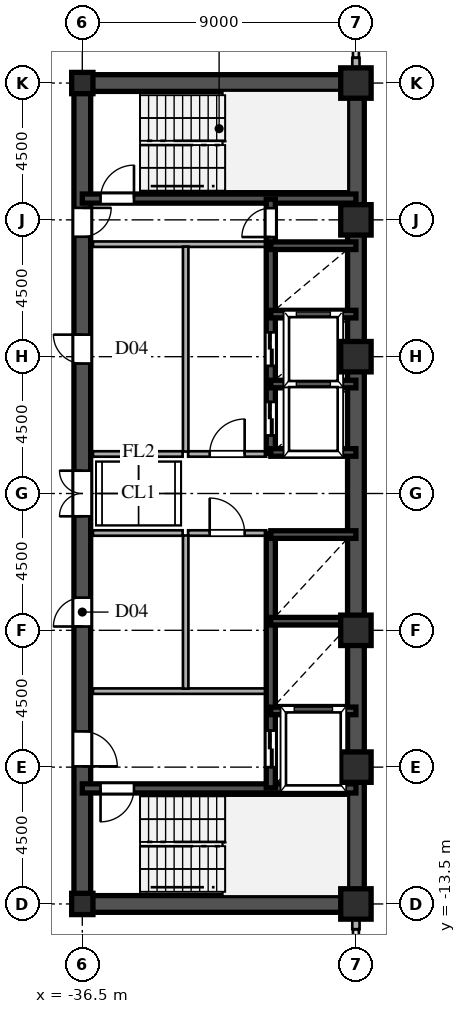
"""IFC4 building model, lengths in metres.
Left out: names, types, materials, properties, quantities, classifications, styles, units other than length and angle.
Written with IfcOpenShell. Run it as: python <this file> out.ifc"""

import sys

from ifc_helpers import new_model, si_unit, direction, frame, frame_2d, origin, origin_2d, place, context, subcontext, project, spatial, rectangle, hollow_rectangle, i_section, extrude, source, transform, mapped, element, fill, save


model = new_model("IFC4")
c1 = context("Model", 3, precision=1e-05, world=origin(), true_north=direction((0.0, 1.0)))
c2 = subcontext(c1, "Body", "Model", "MODEL_VIEW")
j1 = project(units=[si_unit("LENGTHUNIT", "METRE"), si_unit("PLANEANGLEUNIT", "RADIAN")], contexts=[c1])
p1 = place(None, origin())
s1 = spatial("IfcSite", under=j1, at=p1, CompositionType="ELEMENT")
p2 = place(p1, origin())
s2 = spatial("IfcBuilding", under=s1, at=p2, CompositionType="ELEMENT")
p3 = place(p2, frame((0.0, 0.0, 140.4)))
s3 = spatial("IfcBuildingStorey", under=s2, at=p3, CompositionType="ELEMENT", Elevation=140.4)
m1 = source(origin(), c2, "Body", "SweptSolid", [
    extrude(hollow_rectangle(XDim=1.0, YDim=1.0, WallThickness=0.042, at=origin_2d()), origin(), (0.0, 0.0, 1.0), 3.6),
])
for number, where, z_axis, x_axis in (
    (1, (-27.5, -13.5, 0.0), (0.0, 0.0, 1.0), (1.0, 0.0, 0.0)),
    (2, (-27.5, -9.0, 0.0), (0.0, 0.0, 1.0), (1.0, 0.0, 0.0)),
    (3, (-27.5, -4.5, 0.0), (0.0, 0.0, 1.0), (1.0, 0.0, 0.0)),
    (4, (-27.5, 4.5, 0.0), (0.0, 0.0, 1.0), (1.0, 0.0, 0.0)),
    (5, (-27.5, 9.0, 0.0), (0.0, 0.0, 1.0), (1.0, 0.0, 0.0)),
    (6, (-27.5, 13.5, 0.0), (0.0, 0.0, 1.0), (1.0, 0.0, 0.0)),
):
    element("IfcColumn", number, at=place(p3, frame(where, z_axis=z_axis, x_axis=x_axis)), inside=s3, PredefinedType="COLUMN", context=c2, shape_type="MappedRepresentation", body=[
        mapped(m1, transform((0.0, 0.0, 0.0), scale=1.0)),
    ])
m2 = source(origin(), c2, "Body", "SweptSolid", [
    extrude(i_section(OverallWidth=0.7, OverallDepth=0.7, WebThickness=0.028, FlangeThickness=0.045, at=origin_2d()), origin(), (0.0, 0.0, 1.0), 3.6),
])
for number, where, z_axis, x_axis in (
    (7, (-36.5, -13.5, 0.0), (0.0, 0.0, 1.0), (1.0, 0.0, 0.0)),
    (8, (-36.5, 13.5, 0.0), (0.0, 0.0, 1.0), (1.0, 0.0, 0.0)),
):
    element("IfcColumn", number, at=place(p3, frame(where, z_axis=z_axis, x_axis=x_axis)), inside=s3, PredefinedType="COLUMN", context=c2, shape_type="MappedRepresentation", body=[
        mapped(m2, transform((0.0, 0.0, 0.0), scale=1.0)),
    ])
for number, where, z_axis, x_axis in (
    (9, (-27.5, -14.33, 0.0), (0.0, 0.0, 1.0), (0.0, 1.0, 0.0)),
    (10, (-27.5, 13.78, 0.0), (0.0, 0.0, 1.0), (0.0, 1.0, 0.0)),
):
    element("IfcWall", number, at=place(p3, frame(where, z_axis=z_axis, x_axis=x_axis)), inside=s3, PredefinedType="SOLIDWALL", context=c2, shape_type="SweptSolid", body=[
        extrude(rectangle(XDim=0.55, YDim=0.24, at=frame_2d((0.275, 0.0))), origin(), (0.0, 0.0, 1.0), 2.88),
    ])
for number, where, z_axis, x_axis in (
    (11, (-27.5, -13.5, 0.0), (0.0, 0.0, 1.0), (0.0, 1.0, 0.0)),
    (12, (-27.5, 1.3, 0.0), (0.0, 0.0, 1.0), (0.0, 1.0, 0.0)),
):
    element("IfcWall", number, at=place(p3, frame(where, z_axis=z_axis, x_axis=x_axis)), inside=s3, PredefinedType="SHEAR", context=c2, shape_type="SweptSolid", body=[
        extrude(rectangle(XDim=12.2, YDim=0.55, at=frame_2d((6.1, 0.0))), origin(), (0.0, 0.0, 1.0), 3.38),
    ])
p4 = place(p3, frame((-27.5, -1.3, 0.0), z_axis=(0.0, 0.0, 1.0), x_axis=(0.0, 1.0, 0.0)))
e13 = element("IfcWall", 13, at=p4, inside=s3, PredefinedType="SHEAR", context=c2, shape_type="SweptSolid", body=[
    extrude(rectangle(XDim=2.6, YDim=0.55, at=frame_2d((1.3, 0.0))), origin(), (0.0, 0.0, 1.0), 3.38),
])
for number, where, z_axis, x_axis in (
    (14, (-36.5, -13.5, 0.0), (0.0, 0.0, 1.0), (1.0, 0.0, 0.0)),
    (15, (-36.5, 13.5, 0.0), (0.0, 0.0, 1.0), (1.0, 0.0, 0.0)),
):
    element("IfcWall", number, at=place(p3, frame(where, z_axis=z_axis, x_axis=x_axis)), inside=s3, PredefinedType="SHEAR", context=c2, shape_type="SweptSolid", body=[
        extrude(rectangle(XDim=9.0, YDim=0.55, at=frame_2d((4.5, 0.0))), origin(), (0.0, 0.0, 1.0), 3.38),
    ])
p5 = place(p3, frame((-36.5, -13.65, 0.0), z_axis=(0.0, 0.0, 1.0), x_axis=(0.0, 1.0, 0.0)))
e16 = element("IfcWall", 16, at=p5, inside=s3, PredefinedType="SHEAR", context=c2, shape_type="SweptSolid", body=[
    extrude(rectangle(XDim=7.15, YDim=0.55, at=frame_2d((3.575, 0.0))), origin(), (0.0, 0.0, 1.0), 3.38),
])
p6 = place(p5, frame((4.675, 0.0, 0.0)))
e17 = element("IfcOpeningElement", 17, at=p6, cuts=e16, PredefinedType="OPENING", context=c2, shape_type="SweptSolid", body=[
    extrude(rectangle(XDim=1.15, YDim=2.2, at=frame_2d((0.575, 1.1))), frame((0.0, 0.285, 0.0), z_axis=(0.0, -1.0, 0.0), x_axis=(1.0, 0.0, 0.0)), (0.0, 0.0, 1.0), 0.57),
])
p7 = place(p3, frame((-36.5, -1.3, 0.0), z_axis=(0.0, 0.0, 1.0), x_axis=(0.0, 1.0, 0.0)))
e18 = element("IfcWall", 18, at=p7, inside=s3, PredefinedType="SHEAR", context=c2, shape_type="SweptSolid", body=[
    extrude(rectangle(XDim=2.6, YDim=0.55, at=frame_2d((1.3, 0.0))), origin(), (0.0, 0.0, 1.0), 3.38),
])
p8 = place(p7, frame((0.55, 0.0, 0.0)))
e19 = element("IfcOpeningElement", 19, at=p8, cuts=e18, PredefinedType="OPENING", context=c2, shape_type="SweptSolid", body=[
    extrude(rectangle(XDim=1.5, YDim=2.3, at=frame_2d((0.75, 1.15))), frame((0.0, 0.285, 0.0), z_axis=(0.0, -1.0, 0.0), x_axis=(1.0, 0.0, 0.0)), (0.0, 0.0, 1.0), 0.57),
])
p9 = place(p3, frame((-36.5, 8.2, 0.0), z_axis=(0.0, 0.0, 1.0), x_axis=(0.0, 1.0, 0.0)))
e20 = element("IfcWall", 20, at=p9, inside=s3, PredefinedType="SHEAR", context=c2, shape_type="SweptSolid", body=[
    extrude(rectangle(XDim=5.45, YDim=0.55, at=frame_2d((2.725, 0.0))), origin(), (0.0, 0.0, 1.0), 3.38),
])
p10 = place(p9, frame((0.245, 0.0, 0.0)))
e21 = element("IfcOpeningElement", 21, at=p10, cuts=e20, PredefinedType="OPENING", context=c2, shape_type="SweptSolid", body=[
    extrude(rectangle(XDim=0.95, YDim=2.15, at=frame_2d((0.475, 1.075))), frame((0.0, 0.285, 0.0), z_axis=(0.0, -1.0, 0.0), x_axis=(1.0, 0.0, 0.0)), (0.0, 0.0, 1.0), 0.57),
])
p11 = place(p3, frame((-36.5, -6.5, 0.0), z_axis=(0.0, 0.0, 1.0), x_axis=(0.0, 1.0, 0.0)))
e22 = element("IfcWall", 22, at=p11, inside=s3, PredefinedType="SHEAR", context=c2, shape_type="SweptSolid", body=[
    extrude(rectangle(XDim=5.2, YDim=0.55, at=frame_2d((2.6, 0.0))), origin(), (0.0, 0.0, 1.0), 3.38),
])
p12 = place(p11, frame((2.125, 0.0, 0.0)))
e23 = element("IfcOpeningElement", 23, at=p12, cuts=e22, PredefinedType="OPENING", context=c2, shape_type="SweptSolid", body=[
    extrude(rectangle(XDim=0.95, YDim=2.15, at=frame_2d((0.475, 1.075))), frame((0.0, 0.285, 0.0), z_axis=(0.0, -1.0, 0.0), x_axis=(1.0, 0.0, 0.0)), (0.0, 0.0, 1.0), 0.57),
])
p13 = place(p3, frame((-36.5, 1.3, 0.0), z_axis=(0.0, 0.0, 1.0), x_axis=(0.0, 1.0, 0.0)))
e24 = element("IfcWall", 24, at=p13, inside=s3, PredefinedType="SHEAR", context=c2, shape_type="SweptSolid", body=[
    extrude(rectangle(XDim=6.9, YDim=0.55, at=frame_2d((3.45, 0.0))), origin(), (0.0, 0.0, 1.0), 3.38),
])
p14 = place(p13, frame((2.975, 0.0, 0.0)))
e25 = element("IfcOpeningElement", 25, at=p14, cuts=e24, PredefinedType="OPENING", context=c2, shape_type="SweptSolid", body=[
    extrude(rectangle(XDim=0.95, YDim=2.15, at=frame_2d((0.475, 1.075))), frame((0.0, 0.285, 0.0), z_axis=(0.0, -1.0, 0.0), x_axis=(1.0, 0.0, 0.0)), (0.0, 0.0, 1.0), 0.57),
])
p15 = place(p3, frame((-36.5, -9.7, 0.0), z_axis=(0.0, 0.0, 1.0), x_axis=(1.0, 0.0, 0.0)))
e26 = element("IfcWall", 26, at=p15, inside=s3, PredefinedType="SHEAR", context=c2, shape_type="SweptSolid", body=[
    extrude(rectangle(XDim=9.0, YDim=0.3, at=frame_2d((4.5, 0.0))), origin(), (0.0, 0.0, 1.0), 3.38),
])
p16 = place(p15, frame((0.6, 0.0, 0.0)))
e27 = element("IfcOpeningElement", 27, at=p16, cuts=e26, PredefinedType="OPENING", context=c2, shape_type="SweptSolid", body=[
    extrude(rectangle(XDim=1.1, YDim=2.2, at=frame_2d((0.55, 1.1))), frame((0.0, 0.16, 0.0), z_axis=(0.0, -1.0, 0.0), x_axis=(1.0, 0.0, 0.0)), (0.0, 0.0, 1.0), 0.32),
])
p17 = place(p3, frame((-36.5, 9.7, 0.0), z_axis=(0.0, 0.0, 1.0), x_axis=(1.0, 0.0, 0.0)))
e28 = element("IfcWall", 28, at=p17, inside=s3, PredefinedType="SHEAR", context=c2, shape_type="SweptSolid", body=[
    extrude(rectangle(XDim=9.0, YDim=0.3, at=frame_2d((4.5, 0.0))), origin(), (0.0, 0.0, 1.0), 3.38),
])
p18 = place(p17, frame((0.6, 0.0, 0.0)))
e29 = element("IfcOpeningElement", 29, at=p18, cuts=e28, PredefinedType="OPENING", context=c2, shape_type="SweptSolid", body=[
    extrude(rectangle(XDim=1.1, YDim=2.2, at=frame_2d((0.55, 1.1))), frame((0.0, 0.16, 0.0), z_axis=(0.0, -1.0, 0.0), x_axis=(1.0, 0.0, 0.0)), (0.0, 0.0, 1.0), 0.32),
])
for number, where, z_axis, x_axis in (
    (30, (-30.3, -7.15, 0.0), (0.0, 0.0, 1.0), (1.0, 0.0, 0.0)),
    (31, (-30.3, -4.2, 0.0), (0.0, 0.0, 1.0), (1.0, 0.0, 0.0)),
    (32, (-30.3, -1.35, 0.0), (0.0, 0.0, 1.0), (1.0, 0.0, 0.0)),
    (33, (-30.3, 1.35, 0.0), (0.0, 0.0, 1.0), (1.0, 0.0, 0.0)),
    (34, (-30.3, 3.6, 0.0), (0.0, 0.0, 1.0), (1.0, 0.0, 0.0)),
    (35, (-30.3, 5.9, 0.0), (0.0, 0.0, 1.0), (1.0, 0.0, 0.0)),
    (36, (-30.3, 8.15, 0.0), (0.0, 0.0, 1.0), (1.0, 0.0, 0.0)),
):
    element("IfcWall", number, at=place(p3, frame(where, z_axis=z_axis, x_axis=x_axis)), inside=s3, PredefinedType="SHEAR", context=c2, shape_type="SweptSolid", body=[
        extrude(rectangle(XDim=2.8, YDim=0.25, at=frame_2d((1.4, 0.0))), origin(), (0.0, 0.0, 1.0), 3.38),
    ])
p19 = place(p3, frame((-30.3, -9.68, 0.0), z_axis=(0.0, 0.0, 1.0), x_axis=(0.0, 1.0, 0.0)))
e37 = element("IfcWall", 37, at=p19, inside=s3, PredefinedType="SHEAR", context=c2, shape_type="SweptSolid", body=[
    extrude(rectangle(XDim=2.56, YDim=0.3, at=frame_2d((1.28, 0.0))), origin(), (0.0, 0.0, 1.0), 3.38),
])
p20 = place(p19, frame((0.68, 0.0, 0.0)))
e38 = element("IfcOpeningElement", 38, at=p20, cuts=e37, PredefinedType="OPENING", context=c2, shape_type="SweptSolid", body=[
    extrude(rectangle(XDim=1.2, YDim=2.25, at=frame_2d((0.6, 1.125))), frame((0.0, 0.16, 0.0), z_axis=(0.0, -1.0, 0.0), x_axis=(1.0, 0.0, 0.0)), (0.0, 0.0, 1.0), 0.32),
])
p21 = place(p3, frame((-30.3, -7.12, 0.0), z_axis=(0.0, 0.0, 1.0), x_axis=(0.0, 1.0, 0.0)))
e39 = element("IfcWall", 39, at=p21, inside=s3, PredefinedType="SHEAR", context=c2, shape_type="SweptSolid", body=[
    extrude(rectangle(XDim=5.8, YDim=0.3, at=frame_2d((2.9, 0.0))), origin(), (0.0, 0.0, 1.0), 3.38),
])
p22 = place(p3, frame((-30.3, 1.32, 0.0), z_axis=(0.0, 0.0, 1.0), x_axis=(0.0, 1.0, 0.0)))
e40 = element("IfcWall", 40, at=p22, inside=s3, PredefinedType="SHEAR", context=c2, shape_type="SweptSolid", body=[
    extrude(rectangle(XDim=2.28, YDim=0.3, at=frame_2d((1.14, 0.0))), origin(), (0.0, 0.0, 1.0), 3.38),
])
p23 = place(p22, frame((0.59, 0.0, 0.0)))
e41 = element("IfcOpeningElement", 41, at=p23, cuts=e40, PredefinedType="OPENING", context=c2, shape_type="SweptSolid", body=[
    extrude(rectangle(XDim=1.1, YDim=2.2, at=frame_2d((0.55, 1.1))), frame((0.0, 0.16, 0.0), z_axis=(0.0, -1.0, 0.0), x_axis=(1.0, 0.0, 0.0)), (0.0, 0.0, 1.0), 0.32),
])
p24 = place(p3, frame((-30.3, 3.6, 0.0), z_axis=(0.0, 0.0, 1.0), x_axis=(0.0, 1.0, 0.0)))
e42 = element("IfcWall", 42, at=p24, inside=s3, PredefinedType="SHEAR", context=c2, shape_type="SweptSolid", body=[
    extrude(rectangle(XDim=2.3, YDim=0.3, at=frame_2d((1.15, 0.0))), origin(), (0.0, 0.0, 1.0), 3.38),
])
p25 = place(p24, frame((0.6, 0.0, 0.0)))
e43 = element("IfcOpeningElement", 43, at=p25, cuts=e42, PredefinedType="OPENING", context=c2, shape_type="SweptSolid", body=[
    extrude(rectangle(XDim=1.1, YDim=2.2, at=frame_2d((0.55, 1.1))), frame((0.0, 0.16, 0.0), z_axis=(0.0, -1.0, 0.0), x_axis=(1.0, 0.0, 0.0)), (0.0, 0.0, 1.0), 0.32),
])
p26 = place(p3, frame((-30.3, 5.9, 0.0), z_axis=(0.0, 0.0, 1.0), x_axis=(0.0, 1.0, 0.0)))
e44 = element("IfcWall", 44, at=p26, inside=s3, PredefinedType="SHEAR", context=c2, shape_type="SweptSolid", body=[
    extrude(rectangle(XDim=2.25, YDim=0.3, at=frame_2d((1.125, 0.0))), origin(), (0.0, 0.0, 1.0), 3.38),
])
p27 = place(p3, frame((-30.3, 8.15, 0.0), z_axis=(0.0, 0.0, 1.0), x_axis=(0.0, 1.0, 0.0)))
e45 = element("IfcWall", 45, at=p27, inside=s3, PredefinedType="SHEAR", context=c2, shape_type="SweptSolid", body=[
    extrude(rectangle(XDim=1.53, YDim=0.3, at=frame_2d((0.765, 0.0))), origin(), (0.0, 0.0, 1.0), 3.38),
])
p28 = place(p27, frame((0.285, 0.0, 0.0)))
e46 = element("IfcOpeningElement", 46, at=p28, cuts=e45, PredefinedType="OPENING", context=c2, shape_type="SweptSolid", body=[
    extrude(rectangle(XDim=0.95, YDim=2.15, at=frame_2d((0.475, 1.075))), frame((0.0, 0.16, 0.0), z_axis=(0.0, -1.0, 0.0), x_axis=(1.0, 0.0, 0.0)), (0.0, 0.0, 1.0), 0.32),
])
for number, where, z_axis, x_axis in (
    (47, (-36.15, -6.5, 0.0), (0.0, 0.0, 1.0), (1.0, 0.0, 0.0)),
    (48, (-36.15, 8.2, 0.0), (0.0, 0.0, 1.0), (1.0, 0.0, 0.0)),
):
    element("IfcWall", number, at=place(p3, frame(where, z_axis=z_axis, x_axis=x_axis)), inside=s3, PredefinedType="PARTITIONING", context=c2, shape_type="SweptSolid", body=[
        extrude(rectangle(XDim=5.7, YDim=0.18, at=frame_2d((2.85, 0.0))), origin(), (0.0, 0.0, 1.0), 3.38),
    ])
p29 = place(p3, frame((-33.1, -6.42, 0.0), z_axis=(0.0, 0.0, 1.0), x_axis=(0.0, 1.0, 0.0)))
e49 = element("IfcWall", 49, at=p29, inside=s3, PredefinedType="PARTITIONING", context=c2, shape_type="SweptSolid", body=[
    extrude(rectangle(XDim=5.04, YDim=0.18, at=frame_2d((2.52, 0.0))), origin(), (0.0, 0.0, 1.0), 3.38),
])
p30 = place(p3, frame((-33.1, 1.38, 0.0), z_axis=(0.0, 0.0, 1.0), x_axis=(0.0, 1.0, 0.0)))
e50 = element("IfcWall", 50, at=p30, inside=s3, PredefinedType="PARTITIONING", context=c2, shape_type="SweptSolid", body=[
    extrude(rectangle(XDim=6.74, YDim=0.18, at=frame_2d((3.37, 0.0))), origin(), (0.0, 0.0, 1.0), 3.38),
])
p31 = place(p3, frame((-33.02, -1.3, 0.0), z_axis=(0.0, 0.0, 1.0), x_axis=(1.0, 0.0, 0.0)))
e51 = element("IfcWall", 51, at=p31, inside=s3, PredefinedType="PARTITIONING", context=c2, shape_type="SweptSolid", body=[
    extrude(rectangle(XDim=2.57, YDim=0.18, at=frame_2d((1.285, 0.0))), origin(), (0.0, 0.0, 1.0), 3.38),
])
p32 = place(p31, frame((0.71, 0.0, 0.0)))
e52 = element("IfcOpeningElement", 52, at=p32, cuts=e51, PredefinedType="OPENING", context=c2, shape_type="SweptSolid", body=[
    extrude(rectangle(XDim=1.15, YDim=2.2, at=frame_2d((0.575, 1.1))), frame((0.0, 0.1, 0.0), z_axis=(0.0, -1.0, 0.0), x_axis=(1.0, 0.0, 0.0)), (0.0, 0.0, 1.0), 0.2),
])
p33 = place(p3, frame((-33.02, 1.3, 0.0), z_axis=(0.0, 0.0, 1.0), x_axis=(1.0, 0.0, 0.0)))
e53 = element("IfcWall", 53, at=p33, inside=s3, PredefinedType="PARTITIONING", context=c2, shape_type="SweptSolid", body=[
    extrude(rectangle(XDim=2.57, YDim=0.18, at=frame_2d((1.285, 0.0))), origin(), (0.0, 0.0, 1.0), 3.38),
])
p34 = place(p33, frame((0.71, 0.0, 0.0)))
e54 = element("IfcOpeningElement", 54, at=p34, cuts=e53, PredefinedType="OPENING", context=c2, shape_type="SweptSolid", body=[
    extrude(rectangle(XDim=1.15, YDim=2.2, at=frame_2d((0.575, 1.1))), frame((0.0, 0.1, 0.0), z_axis=(0.0, -1.0, 0.0), x_axis=(1.0, 0.0, 0.0)), (0.0, 0.0, 1.0), 0.2),
])
for number, where, z_axis, x_axis in (
    (55, (-36.15, -1.3, 0.0), (0.0, 0.0, 1.0), (1.0, 0.0, 0.0)),
    (56, (-36.15, 1.3, 0.0), (0.0, 0.0, 1.0), (1.0, 0.0, 0.0)),
):
    element("IfcWall", number, at=place(p3, frame(where, z_axis=z_axis, x_axis=x_axis)), inside=s3, PredefinedType="PARTITIONING", context=c2, shape_type="SweptSolid", body=[
        extrude(rectangle(XDim=2.95, YDim=0.18, at=frame_2d((1.475, 0.0))), origin(), (0.0, 0.0, 1.0), 3.38),
    ])
m3 = source(origin(), c2, "Body", "SweptSolid", [
    extrude(rectangle(XDim=1.15, YDim=2.2, at=frame_2d((0.575, 1.1))), frame((0.0, 0.025, 0.0), z_axis=(0.0, -1.0, 0.0), x_axis=(1.0, 0.0, 0.0)), (0.0, 0.0, 1.0), 0.05),
])
p35 = place(p6, frame((1.15, 0.0, 0.0), z_axis=(0.0, 0.0, 1.0), x_axis=(-1.0, 0.0, 0.0)))
e57 = element("IfcDoor", 57, at=p35, inside=s3, OperationType="SINGLE_SWING_LEFT", PredefinedType="DOOR", context=c2, shape_type="MappedRepresentation", body=[
    mapped(m3, transform((0.0, 0.0, 0.0), scale=1.0)),
])
fill(e17, e57)
m4 = source(origin(), c2, "Body", "SweptSolid", [
    extrude(rectangle(XDim=1.5, YDim=2.3, at=frame_2d((0.75, 1.15))), frame((0.0, 0.025, 0.0), z_axis=(0.0, -1.0, 0.0), x_axis=(1.0, 0.0, 0.0)), (0.0, 0.0, 1.0), 0.05),
])
p36 = place(p8, origin())
e58 = element("IfcDoor", 58, at=p36, inside=s3, OperationType="DOUBLE_SWING_LEFT", PredefinedType="DOOR", context=c2, shape_type="MappedRepresentation", body=[
    mapped(m4, transform((0.0, 0.0, 0.0), scale=1.0)),
])
fill(e19, e58)
m5 = source(origin(), c2, "Body", "SweptSolid", [
    extrude(rectangle(XDim=0.95, YDim=2.15, at=frame_2d((0.475, 1.075))), frame((0.0, 0.025, 0.0), z_axis=(0.0, -1.0, 0.0), x_axis=(1.0, 0.0, 0.0)), (0.0, 0.0, 1.0), 0.05),
])
p37 = place(p10, frame((0.95, 0.0, 0.0), z_axis=(0.0, 0.0, 1.0), x_axis=(-1.0, 0.0, 0.0)))
e59 = element("IfcDoor", 59, at=p37, inside=s3, OperationType="SINGLE_SWING_RIGHT", PredefinedType="DOOR", context=c2, shape_type="MappedRepresentation", body=[
    mapped(m5, transform((0.0, 0.0, 0.0), scale=1.0)),
])
fill(e21, e59)
p38 = place(p12, origin())
e60 = element("IfcDoor", 60, at=p38, inside=s3, OperationType="SINGLE_SWING_LEFT", PredefinedType="DOOR", context=c2, shape_type="MappedRepresentation", body=[
    mapped(m5, transform((0.0, 0.0, 0.0), scale=1.0)),
])
fill(e23, e60)
p39 = place(p14, origin())
e61 = element("IfcDoor", 61, at=p39, inside=s3, OperationType="SINGLE_SWING_RIGHT", PredefinedType="DOOR", context=c2, shape_type="MappedRepresentation", body=[
    mapped(m5, transform((0.0, 0.0, 0.0), scale=1.0)),
])
fill(e25, e61)
m6 = source(origin(), c2, "Body", "SweptSolid", [
    extrude(rectangle(XDim=1.1, YDim=2.2, at=frame_2d((0.55, 1.1))), frame((0.0, 0.025, 0.0), z_axis=(0.0, -1.0, 0.0), x_axis=(1.0, 0.0, 0.0)), (0.0, 0.0, 1.0), 0.05),
])
p40 = place(p16, frame((1.1, 0.0, 0.0), z_axis=(0.0, 0.0, 1.0), x_axis=(-1.0, 0.0, 0.0)))
e62 = element("IfcDoor", 62, at=p40, inside=s3, OperationType="SINGLE_SWING_LEFT", PredefinedType="DOOR", context=c2, shape_type="MappedRepresentation", body=[
    mapped(m6, transform((0.0, 0.0, 0.0), scale=1.0)),
])
fill(e27, e62)
p41 = place(p18, origin())
e63 = element("IfcDoor", 63, at=p41, inside=s3, OperationType="SINGLE_SWING_RIGHT", PredefinedType="DOOR", context=c2, shape_type="MappedRepresentation", body=[
    mapped(m6, transform((0.0, 0.0, 0.0), scale=1.0)),
])
fill(e29, e63)
m7 = source(origin(), c2, "Body", "SweptSolid", [
    extrude(rectangle(XDim=1.2, YDim=2.25, at=frame_2d((0.6, 1.125))), frame((0.0, 0.025, 0.0), z_axis=(0.0, -1.0, 0.0), x_axis=(1.0, 0.0, 0.0)), (0.0, 0.0, 1.0), 0.05),
])
p42 = place(p20, origin())
e64 = element("IfcDoor", 64, at=p42, inside=s3, OperationType="DOUBLE_DOOR_SLIDING", PredefinedType="DOOR", context=c2, shape_type="MappedRepresentation", body=[
    mapped(m7, transform((0.0, 0.0, 0.0), scale=1.0)),
])
fill(e38, e64)
m8 = source(origin(), c2, "Body", "SweptSolid", [
    extrude(rectangle(XDim=1.1, YDim=2.2, at=frame_2d((0.55, 1.1))), frame((0.0, 0.025, 0.0), z_axis=(0.0, -1.0, 0.0), x_axis=(1.0, 0.0, 0.0)), (0.0, 0.0, 1.0), 0.05),
])
p43 = place(p23, origin())
e65 = element("IfcDoor", 65, at=p43, inside=s3, OperationType="DOUBLE_DOOR_SLIDING", PredefinedType="DOOR", context=c2, shape_type="MappedRepresentation", body=[
    mapped(m8, transform((0.0, 0.0, 0.0), scale=1.0)),
])
fill(e41, e65)
p44 = place(p25, origin())
e66 = element("IfcDoor", 66, at=p44, inside=s3, OperationType="DOUBLE_DOOR_SLIDING", PredefinedType="DOOR", context=c2, shape_type="MappedRepresentation", body=[
    mapped(m8, transform((0.0, 0.0, 0.0), scale=1.0)),
])
fill(e43, e66)
p45 = place(p28, origin())
e67 = element("IfcDoor", 67, at=p45, inside=s3, OperationType="SINGLE_SWING_LEFT", PredefinedType="DOOR", context=c2, shape_type="MappedRepresentation", body=[
    mapped(m5, transform((0.0, 0.0, 0.0), scale=1.0)),
])
fill(e46, e67)
p46 = place(p32, origin())
e68 = element("IfcDoor", 68, at=p46, inside=s3, OperationType="SINGLE_SWING_LEFT", PredefinedType="DOOR", context=c2, shape_type="MappedRepresentation", body=[
    mapped(m3, transform((0.0, 0.0, 0.0), scale=1.0)),
])
fill(e52, e68)
p47 = place(p34, origin())
e69 = element("IfcDoor", 69, at=p47, inside=s3, OperationType="SINGLE_SWING_RIGHT", PredefinedType="DOOR", context=c2, shape_type="MappedRepresentation", body=[
    mapped(m3, transform((0.0, 0.0, 0.0), scale=1.0)),
])
fill(e54, e69)
save(model, sys.argv[1])
